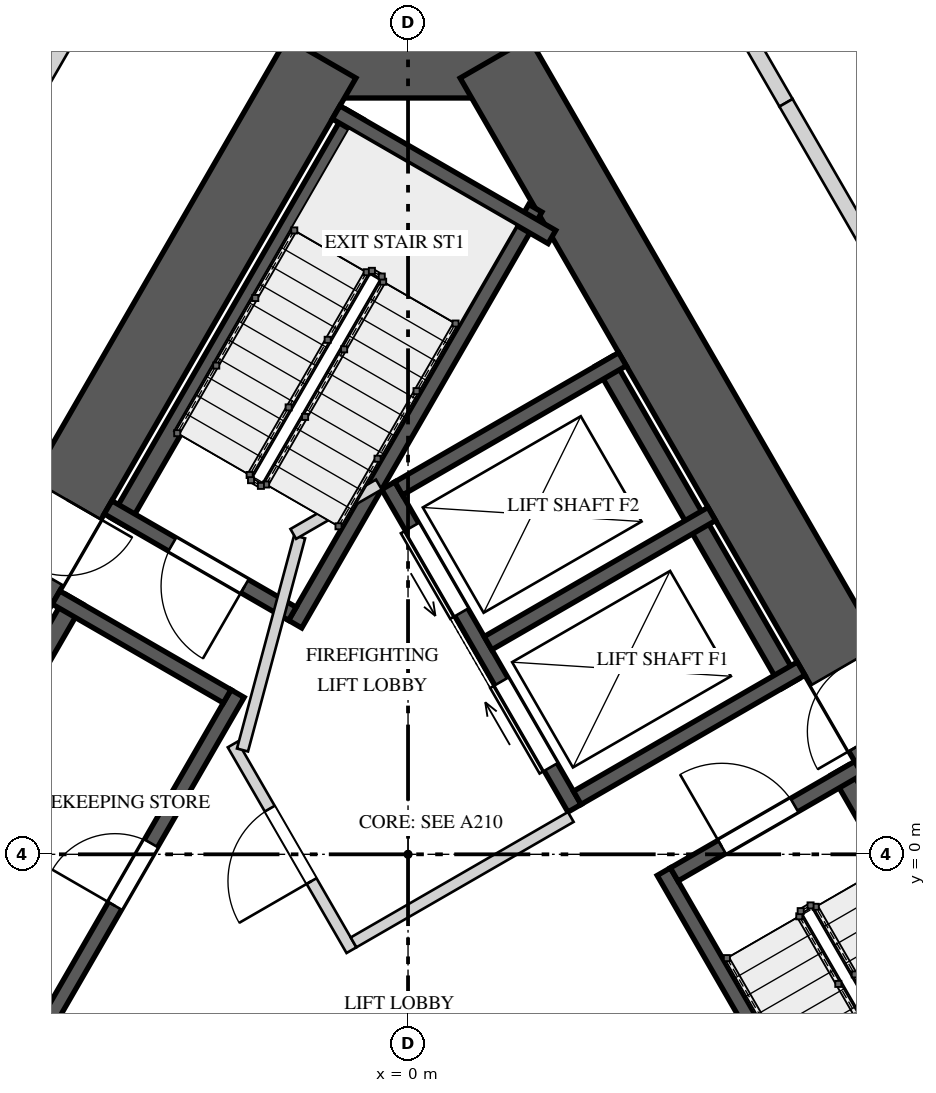
"""IFC4 building model, lengths in metres.
Left out: names, types, materials, properties, quantities, classifications, styles, units other than length and angle.
Written with IfcOpenShell. Run it as: python <this file> out.ifc"""

import sys

from ifc_helpers import new_model, si_unit, direction, frame, frame_2d, origin, place, context, subcontext, project, spatial, rectangle, extrude, element, fill, save


model = new_model("IFC4")
c1 = context("Model", 3, precision=1e-05, world=origin(), true_north=direction((0.0, 1.0)))
c2 = subcontext(c1, "Body", "Model", "MODEL_VIEW")
j1 = project(units=[si_unit("LENGTHUNIT", "METRE"), si_unit("PLANEANGLEUNIT", "RADIAN")], contexts=[c1])
p1 = place(None, origin())
s1 = spatial("IfcSite", under=j1, at=p1, CompositionType="ELEMENT")
p2 = place(p1, origin())
s2 = spatial("IfcBuilding", under=s1, at=p2, CompositionType="ELEMENT")
p3 = place(p2, frame((0.0, 0.0, 51.2)))
s3 = spatial("IfcBuildingStorey", under=s2, at=p3, CompositionType="ELEMENT", Elevation=51.2)
p4 = place(p3, frame((1.443, 10.475, 0.0), z_axis=(0.0, 0.0, 1.0), x_axis=(-1.0, 0.0, 0.0)))
e1 = element("IfcWall", 1, at=p4, inside=s3, PredefinedType="SHEAR", context=c2, shape_type="SweptSolid", body=[
    extrude(rectangle(XDim=2.887, YDim=1.05, at=frame_2d((1.443, 0.0))), origin(), (0.0, 0.0, 1.0), 4.0),
])
p5 = place(p3, frame((-1.14, 10.475, 0.0), z_axis=(0.0, 0.0, 1.0), x_axis=(-0.499985955615, -0.866033512162, 0.0)))
e2 = element("IfcWall", 2, at=p5, inside=s3, PredefinedType="SHEAR", context=c2, shape_type="SweptSolid", body=[
    extrude(rectangle(XDim=17.003, YDim=1.05, at=frame_2d((8.501, 0.0))), origin(), (0.0, 0.0, 1.0), 4.0),
])
p6 = place(p5, frame((6.707, 0.0, 0.0)))
e3 = element("IfcOpeningElement", 3, at=p6, cuts=e2, PredefinedType="OPENING", context=c2, shape_type="SweptSolid", body=[
    extrude(rectangle(XDim=1.0, YDim=2.4, at=frame_2d((0.5, 1.2))), frame((0.0, 0.535, 0.0), z_axis=(0.0, -1.0, 0.0), x_axis=(1.0, 0.0, 0.0)), (0.0, 0.0, 1.0), 1.07),
])
p7 = place(p5, frame((14.472, 0.0, 0.0)))
e4 = element("IfcOpeningElement", 4, at=p7, cuts=e2, PredefinedType="OPENING", context=c2, shape_type="SweptSolid", body=[
    extrude(rectangle(XDim=0.8, YDim=2.1, at=frame_2d((0.4, 1.05))), frame((0.0, 0.535, 0.0), z_axis=(0.0, -1.0, 0.0), x_axis=(1.0, 0.0, 0.0)), (0.0, 0.0, 1.0), 1.07),
])
p8 = place(p3, frame((9.642, -4.25, 0.0), z_axis=(0.0, 0.0, 1.0), x_axis=(-0.499985955615, 0.866033512162, 0.0)))
e5 = element("IfcWall", 5, at=p8, inside=s3, PredefinedType="SHEAR", context=c2, shape_type="SweptSolid", body=[
    extrude(rectangle(XDim=17.003, YDim=1.05, at=frame_2d((8.501, 0.0))), origin(), (0.0, 0.0, 1.0), 4.0),
])
p9 = place(p8, frame((6.776, 0.0, 0.0)))
e6 = element("IfcOpeningElement", 6, at=p9, cuts=e5, PredefinedType="OPENING", context=c2, shape_type="SweptSolid", body=[
    extrude(rectangle(XDim=1.0, YDim=2.4, at=frame_2d((0.5, 1.2))), frame((0.0, 0.535, 0.0), z_axis=(0.0, -1.0, 0.0), x_axis=(1.0, 0.0, 0.0)), (0.0, 0.0, 1.0), 1.07),
])
p10 = place(p3, frame((-0.701, 9.735, 0.0), z_axis=(0.0, 0.0, 1.0), x_axis=(-0.500026960575, -0.86600983753, 0.0)))
e7 = element("IfcWall", 7, at=p10, inside=s3, PredefinedType="SOLIDWALL", context=c2, shape_type="SweptSolid", body=[
    extrude(rectangle(XDim=6.2, YDim=0.25, at=frame_2d((3.1, 0.0))), origin(), (0.0, 0.0, 1.0), 3.65),
])
p11 = place(p3, frame((1.674, 8.5, 0.0), z_axis=(0.0, 0.0, 1.0), x_axis=(-0.499995607161, -0.866027939976, 0.0)))
e8 = element("IfcWall", 8, at=p11, inside=s3, PredefinedType="SOLIDWALL", context=c2, shape_type="SweptSolid", body=[
    extrude(rectangle(XDim=6.318, YDim=0.2, at=frame_2d((3.159, 0.0))), origin(), (0.0, 0.0, 1.0), 3.65),
])
p12 = place(p3, frame((1.893, 8.122, 0.0), z_axis=(0.0, 0.0, 1.0), x_axis=(-0.866006986733, 0.500031897912, 0.0)))
e9 = element("IfcWall", 9, at=p12, inside=s3, PredefinedType="SOLIDWALL", context=c2, shape_type="SweptSolid", body=[
    extrude(rectangle(XDim=3.278, YDim=0.2, at=frame_2d((1.639, 0.0))), origin(), (0.0, 0.0, 1.0), 3.65),
])
p13 = place(p3, frame((-1.521, 3.165, 0.0), z_axis=(0.0, 0.0, 1.0), x_axis=(-0.866034573852, 0.49998411664, 0.0)))
e10 = element("IfcWall", 10, at=p13, inside=s3, PredefinedType="SOLIDWALL", context=c2, shape_type="SweptSolid", body=[
    extrude(rectangle(XDim=2.8, YDim=0.2, at=frame_2d((1.4, 0.0))), origin(), (0.0, 0.0, 1.0), 3.65),
])
p14 = place(p13, frame((0.725, 0.0, 0.0)))
e11 = element("IfcOpeningElement", 11, at=p14, cuts=e10, PredefinedType="OPENING", context=c2, shape_type="SweptSolid", body=[
    extrude(rectangle(XDim=1.1, YDim=2.4, at=frame_2d((0.55, 1.2))), frame((0.0, 0.11, 0.0), z_axis=(0.0, -1.0, 0.0), x_axis=(1.0, 0.0, 0.0)), (0.0, 0.0, 1.0), 0.22),
])
p15 = place(p3, frame((8.781, -4.26, 0.0), z_axis=(0.0, 0.0, 1.0), x_axis=(-0.500009909098, 0.866019682689, 0.0)))
e12 = element("IfcWall", 12, at=p15, inside=s3, PredefinedType="SOLIDWALL", context=c2, shape_type="SweptSolid", body=[
    extrude(rectangle(XDim=6.2, YDim=0.25, at=frame_2d((3.1, 0.0))), origin(), (0.0, 0.0, 1.0), 3.65),
])
p16 = place(p3, frame((6.524, -5.7, 0.0), z_axis=(0.0, 0.0, 1.0), x_axis=(-0.499995607161, 0.866027939976, 0.0)))
e13 = element("IfcWall", 13, at=p16, inside=s3, PredefinedType="SOLIDWALL", context=c2, shape_type="SweptSolid", body=[
    extrude(rectangle(XDim=6.318, YDim=0.2, at=frame_2d((3.159, 0.0))), origin(), (0.0, 0.0, 1.0), 3.65),
])
p17 = place(p3, frame((3.501, -0.265, 0.0), z_axis=(0.0, 0.0, 1.0), x_axis=(0.866034573852, 0.49998411664, 0.0)))
e14 = element("IfcWall", 14, at=p17, inside=s3, PredefinedType="SOLIDWALL", context=c2, shape_type="SweptSolid", body=[
    extrude(rectangle(XDim=2.8, YDim=0.2, at=frame_2d((1.4, 0.0))), origin(), (0.0, 0.0, 1.0), 3.65),
])
p18 = place(p17, frame((0.725, 0.0, 0.0)))
e15 = element("IfcOpeningElement", 15, at=p18, cuts=e14, PredefinedType="OPENING", context=c2, shape_type="SweptSolid", body=[
    extrude(rectangle(XDim=1.1, YDim=2.4, at=frame_2d((0.55, 1.2))), frame((0.0, 0.11, 0.0), z_axis=(0.0, -1.0, 0.0), x_axis=(1.0, 0.0, 0.0)), (0.0, 0.0, 1.0), 0.22),
])
p19 = place(p3, frame((-4.993, -2.648, 0.0), z_axis=(0.0, 0.0, 1.0), x_axis=(0.499996545922, 0.866027397988, 0.0)))
e16 = element("IfcWall", 16, at=p19, inside=s3, PredefinedType="SOLIDWALL", context=c2, shape_type="SweptSolid", body=[
    extrude(rectangle(XDim=5.5, YDim=0.2, at=frame_2d((2.75, 0.0))), origin(), (0.0, 0.0, 1.0), 3.65),
])
p20 = place(p19, frame((2.275, 0.0, 0.0)))
e17 = element("IfcOpeningElement", 17, at=p20, cuts=e16, PredefinedType="OPENING", context=c2, shape_type="SweptSolid", body=[
    extrude(rectangle(XDim=0.95, YDim=2.4, at=frame_2d((0.475, 1.2))), frame((0.0, 0.11, 0.0), z_axis=(0.0, -1.0, 0.0), x_axis=(1.0, 0.0, 0.0)), (0.0, 0.0, 1.0), 0.22),
])
p21 = place(p3, frame((-4.386, 3.352, 0.0), z_axis=(0.0, 0.0, 1.0), x_axis=(-0.500015767406, -0.866016300277, 0.0)))
e18 = element("IfcWall", 18, at=p21, inside=s3, PredefinedType="SOLIDWALL", context=c2, shape_type="SweptSolid", body=[
    extrude(rectangle(XDim=5.5, YDim=0.25, at=frame_2d((2.75, 0.0))), origin(), (0.0, 0.0, 1.0), 3.65),
])
p22 = place(p3, frame((-2.38, 2.078, 0.0), z_axis=(0.0, 0.0, 1.0), x_axis=(-0.866062058628, 0.499936506574, 0.0)))
e19 = element("IfcWall", 19, at=p22, inside=s3, PredefinedType="SOLIDWALL", context=c2, shape_type="SweptSolid", body=[
    extrude(rectangle(XDim=2.6, YDim=0.2, at=frame_2d((1.3, 0.0))), origin(), (0.0, 0.0, 1.0), 3.65),
])
p23 = place(p3, frame((2.19, 0.606, 0.0), z_axis=(0.0, 0.0, 1.0), x_axis=(-0.500002801628, 0.866023786258, 0.0)))
e20 = element("IfcWall", 20, at=p23, inside=s3, PredefinedType="SOLIDWALL", context=c2, shape_type="SweptSolid", body=[
    extrude(rectangle(XDim=4.9, YDim=0.2, at=frame_2d((2.45, 0.0))), origin(), (0.0, 0.0, 1.0), 3.65),
])
p24 = place(p23, frame((0.625, 0.0, 0.0)))
e21 = element("IfcOpeningElement", 21, at=p24, cuts=e20, PredefinedType="OPENING", context=c2, shape_type="SweptSolid", body=[
    extrude(rectangle(XDim=1.3, YDim=2.1, at=frame_2d((0.65, 1.05))), frame((0.0, 0.11, 0.0), z_axis=(0.0, -1.0, 0.0), x_axis=(1.0, 0.0, 0.0)), (0.0, 0.0, 1.0), 0.22),
])
p25 = place(p23, frame((2.975, 0.0, 0.0)))
e22 = element("IfcOpeningElement", 22, at=p25, cuts=e20, PredefinedType="OPENING", context=c2, shape_type="SweptSolid", body=[
    extrude(rectangle(XDim=1.3, YDim=2.1, at=frame_2d((0.65, 1.05))), frame((0.0, 0.11, 0.0), z_axis=(0.0, -1.0, 0.0), x_axis=(1.0, 0.0, 0.0)), (0.0, 0.0, 1.0), 0.22),
])
p26 = place(p3, frame((5.026, 2.244, 0.0), z_axis=(0.0, 0.0, 1.0), x_axis=(-0.500002801628, 0.866023786258, 0.0)))
e23 = element("IfcWall", 23, at=p26, inside=s3, PredefinedType="SOLIDWALL", context=c2, shape_type="SweptSolid", body=[
    extrude(rectangle(XDim=4.9, YDim=0.25, at=frame_2d((2.45, 0.0))), origin(), (0.0, 0.0, 1.0), 3.65),
])
for number, where, z_axis, x_axis in (
    (24, (2.227, 0.743, 0.0), (0.0, 0.0, 1.0), (0.866, 0.5, 0.0)),
    (25, (1.052, 2.778, 0.0), (0.0, 0.0, 1.0), (0.866, 0.5, 0.0)),
):
    element("IfcWall", number, at=place(p3, frame(where, z_axis=z_axis, x_axis=x_axis)), inside=s3, PredefinedType="SOLIDWALL", context=c2, shape_type="SweptSolid", body=[
        extrude(rectangle(XDim=3.4, YDim=0.2, at=frame_2d((1.7, 0.0))), origin(), (0.0, 0.0, 1.0), 3.65),
    ])
p27 = place(p3, frame((-0.123, 4.813, 0.0), z_axis=(0.0, 0.0, 1.0), x_axis=(0.866020560687, 0.500008388397, 0.0)))
e26 = element("IfcWall", 26, at=p27, inside=s3, PredefinedType="SOLIDWALL", context=c2, shape_type="SweptSolid", body=[
    extrude(rectangle(XDim=3.4, YDim=0.2, at=frame_2d((1.7, 0.0))), origin(), (0.0, 0.0, 1.0), 3.65),
])
p28 = place(p3, frame((-0.744, -1.261, 0.0), z_axis=(0.0, 0.0, 1.0), x_axis=(-0.500004234368, 0.866022959057, 0.0)))
e27 = element("IfcWall", 27, at=p28, inside=s3, PredefinedType="PARTITIONING", context=c2, shape_type="SweptSolid", body=[
    extrude(rectangle(XDim=3.125, YDim=0.15, at=frame_2d((1.562, 0.0))), origin(), (0.0, 0.0, 1.0), 3.65),
])
p29 = place(p28, frame((1.05, 0.0, 0.0)))
e28 = element("IfcOpeningElement", 28, at=p29, cuts=e27, PredefinedType="OPENING", context=c2, shape_type="SweptSolid", body=[
    extrude(rectangle(XDim=1.1, YDim=2.4, at=frame_2d((0.55, 1.2))), frame((0.0, 0.085, 0.0), z_axis=(0.0, -1.0, 0.0), x_axis=(1.0, 0.0, 0.0)), (0.0, 0.0, 1.0), 0.17),
])
p30 = place(p3, frame((-0.717, -1.159, 0.0), z_axis=(0.0, 0.0, 1.0), x_axis=(0.866008176907, 0.50002983664, 0.0)))
e29 = element("IfcWall", 29, at=p30, inside=s3, PredefinedType="PARTITIONING", context=c2, shape_type="SweptSolid", body=[
    extrude(rectangle(XDim=3.3, YDim=0.15, at=frame_2d((1.65, 0.0))), origin(), (0.0, 0.0, 1.0), 3.65),
])
p31 = place(p3, frame((-2.178, 1.372, 0.0), z_axis=(0.0, 0.0, 1.0), x_axis=(0.258808958833, 0.96592852884, 0.0)))
e30 = element("IfcWall", 30, at=p31, inside=s3, PredefinedType="PARTITIONING", context=c2, shape_type="SweptSolid", body=[
    extrude(rectangle(XDim=2.903, YDim=0.15, at=frame_2d((1.451, 0.0))), origin(), (0.0, 0.0, 1.0), 3.65),
])
p32 = place(p3, frame((-1.51, 4.215, 0.0), z_axis=(0.0, 0.0, 1.0), x_axis=(0.866085525409, 0.49989585183, 0.0)))
e31 = element("IfcWall", 31, at=p32, inside=s3, PredefinedType="PARTITIONING", context=c2, shape_type="SweptSolid", body=[
    extrude(rectangle(XDim=1.3, YDim=0.15, at=frame_2d((0.65, 0.0))), origin(), (0.0, 0.0, 1.0), 3.65),
])
p33 = place(p3, frame((4.482, 10.737, 0.0), z_axis=(0.0, 0.0, 1.0), x_axis=(0.499966601515, -0.86604468555, 0.0)))
e32 = element("IfcWall", 32, at=p33, inside=s3, PredefinedType="SOLIDWALL", context=c2, shape_type="SweptSolid", body=[
    extrude(rectangle(XDim=0.981, YDim=0.2, at=frame_2d((0.49, 0.0))), origin(), (0.0, 0.0, 1.0), 2.75),
])
p34 = place(p3, frame((4.973, 9.887, 0.0), z_axis=(0.0, 0.0, 1.0), x_axis=(0.500000470374, -0.866025132214, 0.0)))
e33 = element("IfcWall", 33, at=p34, inside=s3, PredefinedType="SOLIDWALL", context=c2, shape_type="SweptSolid", body=[
    extrude(rectangle(XDim=4.257, YDim=0.2, at=frame_2d((2.128, 0.0))), origin(), (0.0, 0.0, 1.0), 3.65),
])
p35 = place(p3, frame((-4.958, 9.913, 0.0), z_axis=(0.0, 0.0, 1.0), x_axis=(0.499951133605, 0.866053614973, 0.0)))
e34 = element("IfcWall", 34, at=p35, inside=s3, PredefinedType="SOLIDWALL", context=c2, shape_type="SweptSolid", body=[
    extrude(rectangle(XDim=1.109, YDim=0.2, at=frame_2d((0.554, 0.0))), origin(), (0.0, 0.0, 1.0), 2.55),
])
p36 = place(p14, origin())
e35 = element("IfcDoor", 35, at=p36, inside=s3, OperationType="SINGLE_SWING_RIGHT", PredefinedType="DOOR", context=c2, shape_type="SweptSolid", body=[
    extrude(rectangle(XDim=1.1, YDim=2.4, at=frame_2d((0.55, 1.2))), frame((0.0, 0.025, 0.0), z_axis=(0.0, -1.0, 0.0), x_axis=(1.0, 0.0, 0.0)), (0.0, 0.0, 1.0), 0.05),
])
fill(e11, e35)
p37 = place(p18, origin())
e36 = element("IfcDoor", 36, at=p37, inside=s3, OperationType="SINGLE_SWING_RIGHT", PredefinedType="DOOR", context=c2, shape_type="SweptSolid", body=[
    extrude(rectangle(XDim=1.1, YDim=2.4, at=frame_2d((0.55, 1.2))), frame((0.0, 0.025, 0.0), z_axis=(0.0, -1.0, 0.0), x_axis=(1.0, 0.0, 0.0)), (0.0, 0.0, 1.0), 0.05),
])
fill(e15, e36)
p38 = place(p20, origin())
e37 = element("IfcDoor", 37, at=p38, inside=s3, OperationType="SINGLE_SWING_LEFT", PredefinedType="DOOR", context=c2, shape_type="SweptSolid", body=[
    extrude(rectangle(XDim=0.95, YDim=2.4, at=frame_2d((0.475, 1.2))), frame((0.0, 0.025, 0.0), z_axis=(0.0, -1.0, 0.0), x_axis=(1.0, 0.0, 0.0)), (0.0, 0.0, 1.0), 0.05),
])
fill(e17, e37)
p39 = place(p24, origin())
e38 = element("IfcDoor", 38, at=p39, inside=s3, OperationType="SLIDING_TO_RIGHT", PredefinedType="DOOR", context=c2, shape_type="SweptSolid", body=[
    extrude(rectangle(XDim=1.3, YDim=2.1, at=frame_2d((0.65, 1.05))), frame((0.0, 0.025, 0.0), z_axis=(0.0, -1.0, 0.0), x_axis=(1.0, 0.0, 0.0)), (0.0, 0.0, 1.0), 0.05),
])
fill(e21, e38)
p40 = place(p25, origin())
e39 = element("IfcDoor", 39, at=p40, inside=s3, OperationType="SLIDING_TO_LEFT", PredefinedType="DOOR", context=c2, shape_type="SweptSolid", body=[
    extrude(rectangle(XDim=1.3, YDim=2.1, at=frame_2d((0.65, 1.05))), frame((0.0, 0.025, 0.0), z_axis=(0.0, -1.0, 0.0), x_axis=(1.0, 0.0, 0.0)), (0.0, 0.0, 1.0), 0.05),
])
fill(e22, e39)
p41 = place(p29, origin())
e40 = element("IfcDoor", 40, at=p41, inside=s3, OperationType="SINGLE_SWING_RIGHT", PredefinedType="DOOR", context=c2, shape_type="SweptSolid", body=[
    extrude(rectangle(XDim=1.1, YDim=2.4, at=frame_2d((0.55, 1.2))), frame((0.0, 0.025, 0.0), z_axis=(0.0, -1.0, 0.0), x_axis=(1.0, 0.0, 0.0)), (0.0, 0.0, 1.0), 0.05),
])
fill(e28, e40)
p42 = place(p6, origin())
e41 = element("IfcDoor", 41, at=p42, inside=s3, OperationType="SINGLE_SWING_LEFT", PredefinedType="DOOR", context=c2, shape_type="SweptSolid", body=[
    extrude(rectangle(XDim=1.0, YDim=2.4, at=frame_2d((0.5, 1.2))), frame((0.0, 0.025, 0.0), z_axis=(0.0, -1.0, 0.0), x_axis=(1.0, 0.0, 0.0)), (0.0, 0.0, 1.0), 0.05),
])
fill(e3, e41)
p43 = place(p9, origin())
e42 = element("IfcDoor", 42, at=p43, inside=s3, OperationType="SINGLE_SWING_LEFT", PredefinedType="DOOR", context=c2, shape_type="SweptSolid", body=[
    extrude(rectangle(XDim=1.0, YDim=2.4, at=frame_2d((0.5, 1.2))), frame((0.0, 0.025, 0.0), z_axis=(0.0, -1.0, 0.0), x_axis=(1.0, 0.0, 0.0)), (0.0, 0.0, 1.0), 0.05),
])
fill(e6, e42)
save(model, sys.argv[1])
